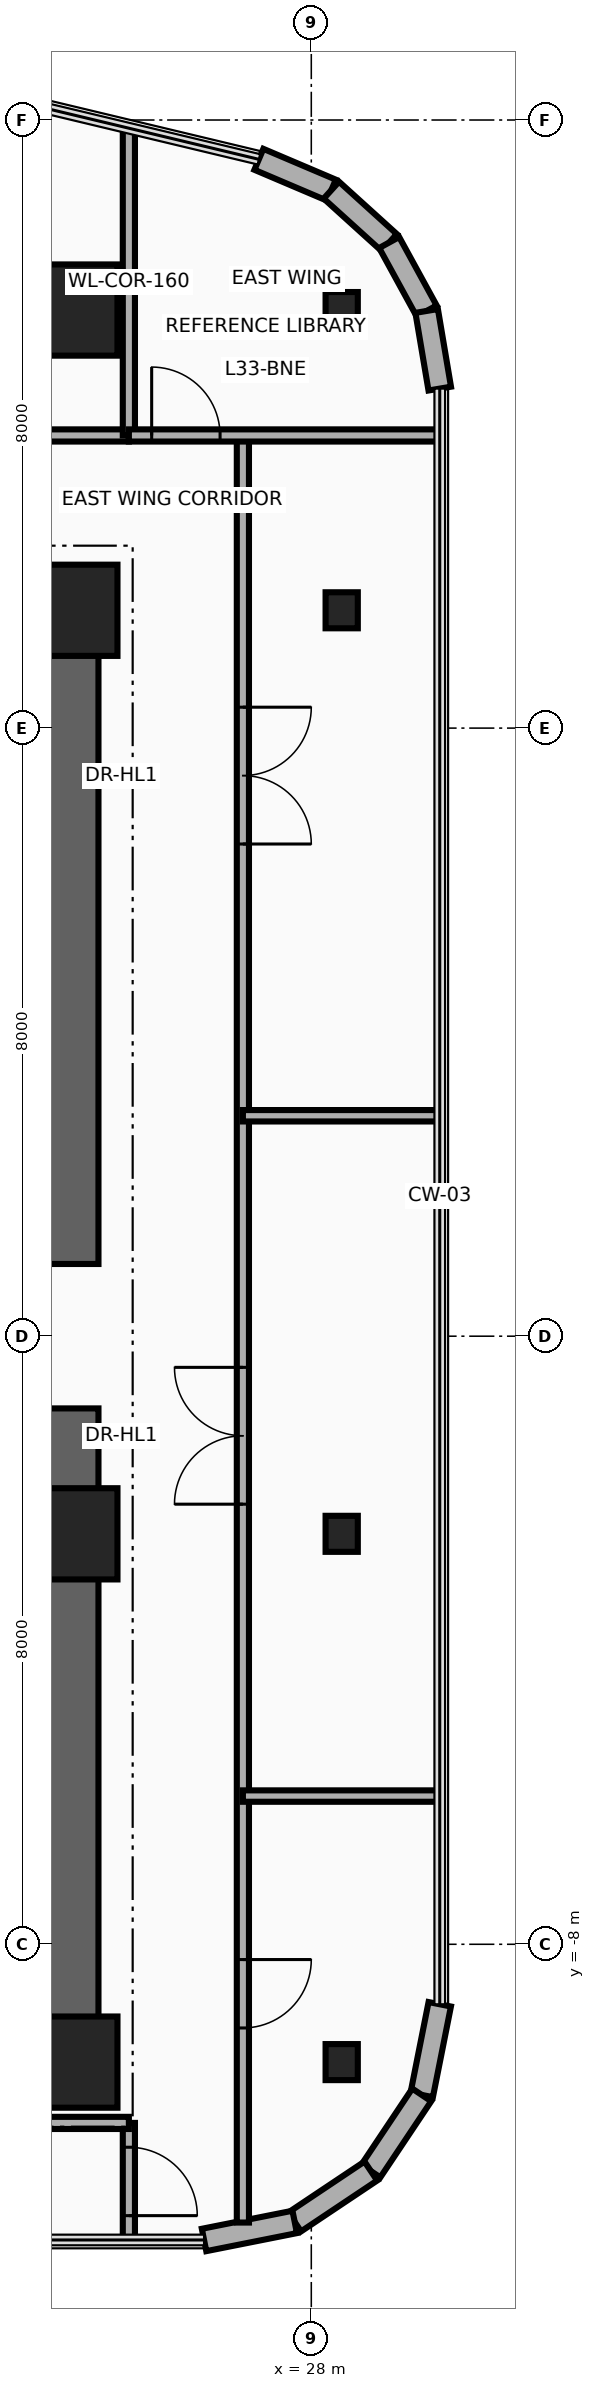
"""IFC4 building model, lengths in metres.
Left out: names, types, materials, properties, quantities, classifications, styles, units other than length and angle.
Written with IfcOpenShell. Run it as: python <this file> out.ifc"""

import sys

from ifc_helpers import new_model, si_unit, direction, frame, frame_2d, origin, origin_2d, place, context, subcontext, project, spatial, rectangle, i_section, extrude, source, transform, mapped, element, fill, save


model = new_model("IFC4")
c1 = context("Model", 3, precision=1e-05, world=origin(), true_north=direction((0.0, 1.0)))
c2 = subcontext(c1, "Body", "Model", "MODEL_VIEW")
j1 = project(units=[si_unit("LENGTHUNIT", "METRE"), si_unit("PLANEANGLEUNIT", "RADIAN")], contexts=[c1])
p1 = place(None, origin())
s1 = spatial("IfcSite", under=j1, at=p1, CompositionType="ELEMENT")
p2 = place(p1, origin())
s2 = spatial("IfcBuilding", under=s1, at=p2, CompositionType="ELEMENT")
p3 = place(p2, frame((0.0, 0.0, 131.6)))
s3 = spatial("IfcBuildingStorey", under=s2, at=p3, CompositionType="ELEMENT", Elevation=131.6)
for number, where, z_axis, x_axis in (
    (1, (24.85, -9.9, 0.0), (0.0, 0.0, 1.0), (0.0, 1.0, 0.0)),
    (2, (24.85, 0.95, 0.0), (0.0, 0.0, 1.0), (0.0, 1.0, 0.0)),
):
    element("IfcWall", number, at=place(p3, frame(where, z_axis=z_axis, x_axis=x_axis)), inside=s3, PredefinedType="SHEAR", context=c2, shape_type="SweptSolid", body=[
        extrude(rectangle(XDim=8.95, YDim=0.7, at=frame_2d((4.475, 0.0))), origin(), (0.0, 0.0, 1.0), 3.46),
    ])
for number, where, z_axis, x_axis in (
    (3, (15.85, 9.55, 0.0), (0.0, 0.0, 1.0), (1.0, 0.0, 0.0)),
    (4, (15.85, -9.55, 0.0), (0.0, 0.0, 1.0), (1.0, 0.0, 0.0)),
):
    element("IfcWall", number, at=place(p3, frame(where, z_axis=z_axis, x_axis=x_axis)), inside=s3, PredefinedType="SHEAR", context=c2, shape_type="SweptSolid", body=[
        extrude(rectangle(XDim=9.0, YDim=0.7, at=frame_2d((4.5, 0.0))), origin(), (0.0, 0.0, 1.0), 3.46),
    ])
m1 = source(origin(), c2, "Body", "SweptSolid", [
    extrude(rectangle(XDim=1.2, YDim=1.2, at=origin_2d()), origin(), (0.0, 0.0, 1.0), 3.7),
])
p4 = place(p3, frame((24.85, -9.55, 0.0), z_axis=(0.0, 0.0, 1.0), x_axis=(1.0, 0.0, 0.0)))
e5 = element("IfcColumn", 5, at=p4, inside=s3, PredefinedType="COLUMN", context=c2, shape_type="MappedRepresentation", body=[
    mapped(m1, transform((0.0, 0.0, 0.0), x_axis=(1.0, 0.0, 0.0), y_axis=(0.0, 1.0, 0.0), z_axis=(0.0, 0.0, 1.0), scale=1.0)),
])
m2 = source(origin(), c2, "Body", "SweptSolid", [
    extrude(i_section(OverallWidth=0.424, OverallDepth=0.474, WebThickness=0.048, FlangeThickness=0.077, at=origin_2d()), origin(), (0.0, 0.0, 1.0), 3.7),
])
p5 = place(p3, frame((28.4, -9.55, 0.0), z_axis=(0.0, 0.0, 1.0), x_axis=(1.0, 0.0, 0.0)))
e6 = element("IfcColumn", 6, at=p5, inside=s3, PredefinedType="COLUMN", context=c2, shape_type="MappedRepresentation", body=[
    mapped(m2, transform((0.0, 0.0, 0.0), x_axis=(1.0, 0.0, 0.0), y_axis=(0.0, 1.0, 0.0), z_axis=(0.0, 0.0, 1.0), scale=1.0)),
])
p6 = place(p3, frame((24.85, -2.6, 0.0), z_axis=(0.0, 0.0, 1.0), x_axis=(1.0, 0.0, 0.0)))
e7 = element("IfcColumn", 7, at=p6, inside=s3, PredefinedType="COLUMN", context=c2, shape_type="MappedRepresentation", body=[
    mapped(m1, transform((0.0, 0.0, 0.0), x_axis=(1.0, 0.0, 0.0), y_axis=(0.0, 1.0, 0.0), z_axis=(0.0, 0.0, 1.0), scale=1.0)),
])
p7 = place(p3, frame((28.4, -2.6, 0.0), z_axis=(0.0, 0.0, 1.0), x_axis=(1.0, 0.0, 0.0)))
e8 = element("IfcColumn", 8, at=p7, inside=s3, PredefinedType="COLUMN", context=c2, shape_type="MappedRepresentation", body=[
    mapped(m2, transform((0.0, 0.0, 0.0), x_axis=(1.0, 0.0, 0.0), y_axis=(0.0, 1.0, 0.0), z_axis=(0.0, 0.0, 1.0), scale=1.0)),
])
p8 = place(p3, frame((24.85, 9.55, 0.0), z_axis=(0.0, 0.0, 1.0), x_axis=(1.0, 0.0, 0.0)))
e9 = element("IfcColumn", 9, at=p8, inside=s3, PredefinedType="COLUMN", context=c2, shape_type="MappedRepresentation", body=[
    mapped(m1, transform((0.0, 0.0, 0.0), x_axis=(1.0, 0.0, 0.0), y_axis=(0.0, 1.0, 0.0), z_axis=(0.0, 0.0, 1.0), scale=1.0)),
])
p9 = place(p3, frame((28.4, 9.55, 0.0), z_axis=(0.0, 0.0, 1.0), x_axis=(1.0, 0.0, 0.0)))
e10 = element("IfcColumn", 10, at=p9, inside=s3, PredefinedType="COLUMN", context=c2, shape_type="MappedRepresentation", body=[
    mapped(m2, transform((0.0, 0.0, 0.0), x_axis=(1.0, 0.0, 0.0), y_axis=(0.0, 1.0, 0.0), z_axis=(0.0, 0.0, 1.0), scale=1.0)),
])
p10 = place(p3, frame((24.85, 13.5, 0.0), z_axis=(0.0, 0.0, 1.0), x_axis=(1.0, 0.0, 0.0)))
e11 = element("IfcColumn", 11, at=p10, inside=s3, PredefinedType="COLUMN", context=c2, shape_type="MappedRepresentation", body=[
    mapped(m1, transform((0.0, 0.0, 0.0), x_axis=(1.0, 0.0, 0.0), y_axis=(0.0, 1.0, 0.0), z_axis=(0.0, 0.0, 1.0), scale=1.0)),
])
p11 = place(p3, frame((28.4, 13.5, 0.0), z_axis=(0.0, 0.0, 1.0), x_axis=(1.0, 0.0, 0.0)))
e12 = element("IfcColumn", 12, at=p11, inside=s3, PredefinedType="COLUMN", context=c2, shape_type="MappedRepresentation", body=[
    mapped(m2, transform((0.0, 0.0, 0.0), x_axis=(1.0, 0.0, 0.0), y_axis=(0.0, 1.0, 0.0), z_axis=(0.0, 0.0, 1.0), scale=1.0)),
])
p12 = place(p3, frame((27.31, 15.483, 0.0), z_axis=(0.0, 0.0, 1.0), x_axis=(0.920250328759, -0.391330208927, 0.0)))
e13 = element("IfcWall", 13, at=p12, inside=s3, PredefinedType="SOLIDWALL", context=c2, shape_type="SweptSolid", body=[
    extrude(rectangle(XDim=1.036, YDim=0.3, at=frame_2d((0.518, 0.0))), origin(), (0.0, 0.0, 1.0), 3.46),
])
p13 = place(p3, frame((28.264, 15.077, 0.0), z_axis=(0.0, 0.0, 1.0), x_axis=(0.741208839713, -0.671274501178, 0.0)))
e14 = element("IfcWall", 14, at=p13, inside=s3, PredefinedType="SOLIDWALL", context=c2, shape_type="SweptSolid", body=[
    extrude(rectangle(XDim=1.026, YDim=0.3, at=frame_2d((0.513, 0.0))), origin(), (0.0, 0.0, 1.0), 3.46),
])
p14 = place(p3, frame((29.025, 14.388, 0.0), z_axis=(0.0, 0.0, 1.0), x_axis=(0.480284137298, -0.87711296163, 0.0)))
e15 = element("IfcWall", 15, at=p14, inside=s3, PredefinedType="SOLIDWALL", context=c2, shape_type="SweptSolid", body=[
    extrude(rectangle(XDim=1.027, YDim=0.3, at=frame_2d((0.513, 0.0))), origin(), (0.0, 0.0, 1.0), 3.46),
])
p15 = place(p3, frame((29.518, 13.488, 0.0), z_axis=(0.0, 0.0, 1.0), x_axis=(0.166156796952, -0.986099345313, 0.0)))
e16 = element("IfcWall", 16, at=p15, inside=s3, PredefinedType="SOLIDWALL", context=c2, shape_type="SweptSolid", body=[
    extrude(rectangle(XDim=1.036, YDim=0.3, at=frame_2d((0.518, 0.0))), origin(), (0.0, 0.0, 1.0), 3.46),
])
p16 = place(p3, frame((29.69, -8.789, 0.0), z_axis=(0.0, 0.0, 1.0), x_axis=(-0.194996050505, -0.980804027463, 0.0)))
e17 = element("IfcWall", 17, at=p16, inside=s3, PredefinedType="SOLIDWALL", context=c2, shape_type="SweptSolid", body=[
    extrude(rectangle(XDim=1.216, YDim=0.3, at=frame_2d((0.608, 0.0))), origin(), (0.0, 0.0, 1.0), 3.46),
])
for number, where, z_axis, x_axis in (
    (18, (29.453, -9.982, 0.0), (0.0, 0.0, 1.0), (-0.556, -0.831, 0.0)),
    (19, (28.783, -10.983, 0.0), (0.0, 0.0, 1.0), (-0.831, -0.556, 0.0)),
):
    element("IfcWall", number, at=place(p3, frame(where, z_axis=z_axis, x_axis=x_axis)), inside=s3, PredefinedType="SOLIDWALL", context=c2, shape_type="SweptSolid", body=[
        extrude(rectangle(XDim=1.205, YDim=0.3, at=frame_2d((0.603, 0.0))), origin(), (0.0, 0.0, 1.0), 3.46),
    ])
p17 = place(p3, frame((27.782, -11.653, 0.0), z_axis=(0.0, 0.0, 1.0), x_axis=(-0.980811661072, -0.194957650543, 0.0)))
e20 = element("IfcWall", 20, at=p17, inside=s3, PredefinedType="SOLIDWALL", context=c2, shape_type="SweptSolid", body=[
    extrude(rectangle(XDim=1.216, YDim=0.3, at=frame_2d((0.608, 0.0))), origin(), (0.0, 0.0, 1.0), 3.46),
])
p18 = place(p3, frame((15.4, 11.85, 0.0), z_axis=(0.0, 0.0, 1.0), x_axis=(1.0, 0.0, 0.0)))
e21 = element("IfcWall", 21, at=p18, inside=s3, PredefinedType="PARTITIONING", context=c2, shape_type="SweptSolid", body=[
    extrude(rectangle(XDim=10.2, YDim=0.16, at=frame_2d((5.1, 0.0))), origin(), (0.0, 0.0, 1.0), 2.834),
])
p19 = place(p18, frame((4.65, 0.0, 0.0)))
e22 = element("IfcOpeningElement", 22, at=p19, cuts=e21, PredefinedType="OPENING", context=c2, shape_type="SweptSolid", body=[
    extrude(rectangle(XDim=0.9, YDim=2.1, at=frame_2d((0.45, 1.05))), frame((0.0, 0.095, 0.0), z_axis=(0.0, -1.0, 0.0), x_axis=(1.0, 0.0, 0.0)), (0.0, 0.0, 1.0), 0.19),
])
p20 = place(p3, frame((25.6, 11.85, 0.0), z_axis=(0.0, 0.0, 1.0), x_axis=(0.0, 1.0, 0.0)))
e23 = element("IfcWall", 23, at=p20, inside=s3, PredefinedType="PARTITIONING", context=c2, shape_type="SweptSolid", body=[
    extrude(rectangle(XDim=4.042, YDim=0.16, at=frame_2d((2.021, 0.0))), origin(), (0.0, 0.0, 1.0), 2.666),
])
p21 = place(p3, frame((25.6, -11.89, 0.0), z_axis=(0.0, 0.0, 1.0), x_axis=(0.0, 1.0, 0.0)))
e24 = element("IfcWall", 24, at=p21, inside=s3, PredefinedType="PARTITIONING", context=c2, shape_type="SweptSolid", body=[
    extrude(rectangle(XDim=1.54, YDim=0.16, at=frame_2d((0.77, 0.0))), origin(), (0.0, 0.0, 1.0), 3.46),
])
p22 = place(p21, frame((0.32, 0.0, 0.0)))
e25 = element("IfcOpeningElement", 25, at=p22, cuts=e24, PredefinedType="OPENING", context=c2, shape_type="SweptSolid", body=[
    extrude(rectangle(XDim=0.9, YDim=2.1, at=frame_2d((0.45, 1.05))), frame((0.0, 0.095, 0.0), z_axis=(0.0, -1.0, 0.0), x_axis=(1.0, 0.0, 0.0)), (0.0, 0.0, 1.0), 0.19),
])
p23 = place(p3, frame((14.044, -10.35, 0.0), z_axis=(0.0, 0.0, 1.0), x_axis=(1.0, 0.0, 0.0)))
e26 = element("IfcWall", 26, at=p23, inside=s3, PredefinedType="PARTITIONING", context=c2, shape_type="SweptSolid", body=[
    extrude(rectangle(XDim=11.556, YDim=0.16, at=frame_2d((5.778, 0.0))), origin(), (0.0, 0.0, 1.0), 3.46),
])
p24 = place(p3, frame((27.1, -11.661, 0.0), z_axis=(0.0, 0.0, 1.0), x_axis=(0.0, 1.0, 0.0)))
e27 = element("IfcWall", 27, at=p24, inside=s3, PredefinedType="PARTITIONING", context=c2, shape_type="SweptSolid", body=[
    extrude(rectangle(XDim=23.511, YDim=0.16, at=frame_2d((11.755, 0.0))), origin(), (0.0, 0.0, 1.0), 2.666),
])
p25 = place(p24, frame((2.56, 0.0, 0.0)))
e28 = element("IfcOpeningElement", 28, at=p25, cuts=e27, PredefinedType="OPENING", context=c2, shape_type="SweptSolid", body=[
    extrude(rectangle(XDim=0.9, YDim=2.1, at=frame_2d((0.45, 1.05))), frame((0.0, 0.095, 0.0), z_axis=(0.0, -1.0, 0.0), x_axis=(1.0, 0.0, 0.0)), (0.0, 0.0, 1.0), 0.19),
])
p26 = place(p24, frame((9.451, 0.0, 0.0)))
e29 = element("IfcOpeningElement", 29, at=p26, cuts=e27, PredefinedType="OPENING", context=c2, shape_type="SweptSolid", body=[
    extrude(rectangle(XDim=1.8, YDim=2.15, at=frame_2d((0.9, 1.075))), frame((0.0, 0.095, 0.0), z_axis=(0.0, -1.0, 0.0), x_axis=(1.0, 0.0, 0.0)), (0.0, 0.0, 1.0), 0.19),
])
p27 = place(p24, frame((18.136, 0.0, 0.0)))
e30 = element("IfcOpeningElement", 30, at=p27, cuts=e27, PredefinedType="OPENING", context=c2, shape_type="SweptSolid", body=[
    extrude(rectangle(XDim=1.8, YDim=2.15, at=frame_2d((0.9, 1.075))), frame((0.0, 0.095, 0.0), z_axis=(0.0, -1.0, 0.0), x_axis=(1.0, 0.0, 0.0)), (0.0, 0.0, 1.0), 0.19),
])
p28 = place(p3, frame((25.6, 11.85, 0.0), z_axis=(0.0, 0.0, 1.0), x_axis=(1.0, 0.0, 0.0)))
e31 = element("IfcWall", 31, at=p28, inside=s3, PredefinedType="PARTITIONING", context=c2, shape_type="SweptSolid", body=[
    extrude(rectangle(XDim=4.09, YDim=0.16, at=frame_2d((2.045, 0.0))), origin(), (0.0, 0.0, 1.0), 2.896),
])
p29 = place(p28, frame((0.3, 0.0, 0.0)))
e32 = element("IfcOpeningElement", 32, at=p29, cuts=e31, PredefinedType="OPENING", context=c2, shape_type="SweptSolid", body=[
    extrude(rectangle(XDim=0.9, YDim=2.1, at=frame_2d((0.45, 1.05))), frame((0.0, 0.095, 0.0), z_axis=(0.0, -1.0, 0.0), x_axis=(1.0, 0.0, 0.0)), (0.0, 0.0, 1.0), 0.19),
])
for number, where, z_axis, x_axis in (
    (33, (27.1, -6.05, 0.0), (0.0, 0.0, 1.0), (1.0, 0.0, 0.0)),
    (34, (27.1, 2.9, 0.0), (0.0, 0.0, 1.0), (1.0, 0.0, 0.0)),
):
    element("IfcWall", number, at=place(p3, frame(where, z_axis=z_axis, x_axis=x_axis)), inside=s3, PredefinedType="PARTITIONING", context=c2, shape_type="SweptSolid", body=[
        extrude(rectangle(XDim=2.59, YDim=0.15, at=frame_2d((1.295, 0.0))), origin(), (0.0, 0.0, 1.0), 2.896),
    ])
p30 = place(p22, frame((0.9, 0.0, 0.0), z_axis=(0.0, 0.0, 1.0), x_axis=(-1.0, 0.0, 0.0)))
e35 = element("IfcDoor", 35, at=p30, inside=s3, OperationType="SINGLE_SWING_LEFT", PredefinedType="DOOR", context=c2, shape_type="SweptSolid", body=[
    extrude(rectangle(XDim=0.9, YDim=2.1, at=frame_2d((0.45, 1.05))), frame((0.0, 0.025, 0.0), z_axis=(0.0, -1.0, 0.0), x_axis=(1.0, 0.0, 0.0)), (0.0, 0.0, 1.0), 0.05),
])
fill(e25, e35)
p31 = place(p29, origin())
e36 = element("IfcDoor", 36, at=p31, inside=s3, OperationType="SINGLE_SWING_RIGHT", PredefinedType="DOOR", context=c2, shape_type="SweptSolid", body=[
    extrude(rectangle(XDim=0.9, YDim=2.1, at=frame_2d((0.45, 1.05))), frame((0.0, 0.025, 0.0), z_axis=(0.0, -1.0, 0.0), x_axis=(1.0, 0.0, 0.0)), (0.0, 0.0, 1.0), 0.05),
])
fill(e32, e36)
p32 = place(p25, frame((0.9, 0.0, 0.0), z_axis=(0.0, 0.0, 1.0), x_axis=(-1.0, 0.0, 0.0)))
e37 = element("IfcDoor", 37, at=p32, inside=s3, OperationType="SINGLE_SWING_LEFT", PredefinedType="DOOR", context=c2, shape_type="SweptSolid", body=[
    extrude(rectangle(XDim=0.9, YDim=2.1, at=frame_2d((0.45, 1.05))), frame((0.0, 0.025, 0.0), z_axis=(0.0, -1.0, 0.0), x_axis=(1.0, 0.0, 0.0)), (0.0, 0.0, 1.0), 0.05),
])
fill(e28, e37)
p33 = place(p26, origin())
e38 = element("IfcDoor", 38, at=p33, inside=s3, OperationType="DOUBLE_DOOR_SINGLE_SWING", PredefinedType="DOOR", context=c2, shape_type="SweptSolid", body=[
    extrude(rectangle(XDim=1.8, YDim=2.15, at=frame_2d((0.9, 1.075))), frame((0.0, 0.025, 0.0), z_axis=(0.0, -1.0, 0.0), x_axis=(1.0, 0.0, 0.0)), (0.0, 0.0, 1.0), 0.05),
])
fill(e29, e38)
p34 = place(p27, frame((1.8, 0.0, 0.0), z_axis=(0.0, 0.0, 1.0), x_axis=(-1.0, 0.0, 0.0)))
e39 = element("IfcDoor", 39, at=p34, inside=s3, OperationType="DOUBLE_DOOR_SINGLE_SWING", PredefinedType="DOOR", context=c2, shape_type="SweptSolid", body=[
    extrude(rectangle(XDim=1.8, YDim=2.15, at=frame_2d((0.9, 1.075))), frame((0.0, 0.025, 0.0), z_axis=(0.0, -1.0, 0.0), x_axis=(1.0, 0.0, 0.0)), (0.0, 0.0, 1.0), 0.05),
])
fill(e30, e39)
save(model, sys.argv[1])
